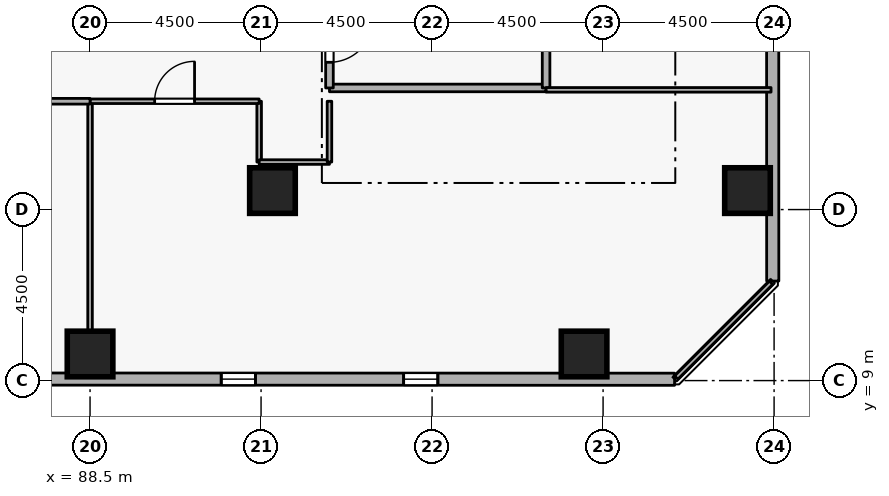
"""IFC4 building model, lengths in metres.
Left out: names, types, materials, properties, quantities, classifications, styles, units other than length and angle.
Written with IfcOpenShell. Run it as: python <this file> out.ifc"""

import sys

from ifc_helpers import new_model, si_unit, direction, frame, frame_2d, origin, origin_2d, place, context, subcontext, project, spatial, rectangle, extrude, element, fill, save


model = new_model("IFC4")
c1 = context("Model", 3, precision=1e-05, world=origin(), true_north=direction((0.0, 1.0)))
c2 = subcontext(c1, "Body", "Model", "MODEL_VIEW")
j1 = project(units=[si_unit("LENGTHUNIT", "METRE"), si_unit("PLANEANGLEUNIT", "RADIAN")], contexts=[c1])
p1 = place(None, origin())
s1 = spatial("IfcSite", under=j1, at=p1, CompositionType="ELEMENT")
p2 = place(p1, origin())
s2 = spatial("IfcBuilding", under=s1, at=p2, CompositionType="ELEMENT")
p3 = place(p2, frame((0.0, 0.0, 83.7)))
s3 = spatial("IfcBuildingStorey", under=s2, at=p3, CompositionType="ELEMENT", Elevation=83.7)
for number, where, z_axis, x_axis in (
    (1, (105.8, 14.0, 0.0), (0.0, 0.0, 1.0), (1.0, 0.0, 0.0)),
    (2, (101.5, 9.7, 0.0), (0.0, 0.0, 1.0), (1.0, 0.0, 0.0)),
    (3, (88.5, 9.7, 0.0), (0.0, 0.0, 1.0), (1.0, 0.0, 0.0)),
    (4, (93.3, 14.0, 0.0), (0.0, 0.0, 1.0), (1.0, 0.0, 0.0)),
):
    element("IfcColumn", number, at=place(p3, frame(where, z_axis=z_axis, x_axis=x_axis)), inside=s3, PredefinedType="COLUMN", context=c2, shape_type="SweptSolid", body=[
        extrude(rectangle(XDim=1.2, YDim=1.2, at=origin_2d()), origin(), (0.0, 0.0, 1.0), 3.6),
    ])
p4 = place(p3, frame((70.052, 9.045, 0.0), z_axis=(0.0, 0.0, 1.0), x_axis=(0.999999960392, -0.000281454314, 0.0)))
e5 = element("IfcWall", 5, at=p4, inside=s3, PredefinedType="STANDARD", context=c2, shape_type="SweptSolid", body=[
    extrude(rectangle(XDim=33.83, YDim=0.32, at=frame_2d((16.915, 0.0))), origin(), (0.0, 0.0, 1.0), 2.7),
])
p5 = place(p4, frame((7.5, 0.0, 0.72)))
e6 = element("IfcOpeningElement", 6, at=p5, cuts=e5, PredefinedType="OPENING", context=c2, shape_type="SweptSolid", body=[
    extrude(rectangle(XDim=0.9, YDim=1.75, at=frame_2d((0.45, 0.875))), frame((0.0, 0.17, 0.0), z_axis=(0.0, -1.0, 0.0), x_axis=(1.0, 0.0, 0.0)), (0.0, 0.0, 1.0), 0.34),
])
p6 = place(p4, frame((12.3, 0.0, 0.72)))
e7 = element("IfcOpeningElement", 7, at=p6, cuts=e5, PredefinedType="OPENING", context=c2, shape_type="SweptSolid", body=[
    extrude(rectangle(XDim=0.9, YDim=1.75, at=frame_2d((0.45, 0.875))), frame((0.0, 0.17, 0.0), z_axis=(0.0, -1.0, 0.0), x_axis=(1.0, 0.0, 0.0)), (0.0, 0.0, 1.0), 0.34),
])
p7 = place(p4, frame((21.9, 0.0, 0.72)))
e8 = element("IfcOpeningElement", 8, at=p7, cuts=e5, PredefinedType="OPENING", context=c2, shape_type="SweptSolid", body=[
    extrude(rectangle(XDim=0.9, YDim=1.75, at=frame_2d((0.45, 0.875))), frame((0.0, 0.17, 0.0), z_axis=(0.0, -1.0, 0.0), x_axis=(1.0, 0.0, 0.0)), (0.0, 0.0, 1.0), 0.34),
])
p8 = place(p4, frame((26.7, 0.0, 0.72)))
e9 = element("IfcOpeningElement", 9, at=p8, cuts=e5, PredefinedType="OPENING", context=c2, shape_type="SweptSolid", body=[
    extrude(rectangle(XDim=0.9, YDim=1.75, at=frame_2d((0.45, 0.875))), frame((0.0, 0.17, 0.0), z_axis=(0.0, -1.0, 0.0), x_axis=(1.0, 0.0, 0.0)), (0.0, 0.0, 1.0), 0.34),
])
p9 = place(p3, frame((106.465, 11.619, 0.0), z_axis=(0.0, 0.0, 1.0), x_axis=(-0.000281454314, 0.999999960392, 0.0)))
e10 = element("IfcWall", 10, at=p9, inside=s3, PredefinedType="STANDARD", context=c2, shape_type="SweptSolid", body=[
    extrude(rectangle(XDim=33.83, YDim=0.32, at=frame_2d((16.915, 0.0))), origin(), (0.0, 0.0, 1.0), 2.7),
])
p10 = place(p9, frame((7.5, 0.0, 0.72)))
e11 = element("IfcOpeningElement", 11, at=p10, cuts=e10, PredefinedType="OPENING", context=c2, shape_type="SweptSolid", body=[
    extrude(rectangle(XDim=0.9, YDim=1.75, at=frame_2d((0.45, 0.875))), frame((0.0, 0.17, 0.0), z_axis=(0.0, -1.0, 0.0), x_axis=(1.0, 0.0, 0.0)), (0.0, 0.0, 1.0), 0.34),
])
p11 = place(p9, frame((12.3, 0.0, 0.72)))
e12 = element("IfcOpeningElement", 12, at=p11, cuts=e10, PredefinedType="OPENING", context=c2, shape_type="SweptSolid", body=[
    extrude(rectangle(XDim=0.9, YDim=1.75, at=frame_2d((0.45, 0.875))), frame((0.0, 0.17, 0.0), z_axis=(0.0, -1.0, 0.0), x_axis=(1.0, 0.0, 0.0)), (0.0, 0.0, 1.0), 0.34),
])
p12 = place(p9, frame((17.1, 0.0, 0.72)))
e13 = element("IfcOpeningElement", 13, at=p12, cuts=e10, PredefinedType="OPENING", context=c2, shape_type="SweptSolid", body=[
    extrude(rectangle(XDim=0.9, YDim=1.75, at=frame_2d((0.45, 0.875))), frame((0.0, 0.17, 0.0), z_axis=(0.0, -1.0, 0.0), x_axis=(1.0, 0.0, 0.0)), (0.0, 0.0, 1.0), 0.34),
])
p13 = place(p9, frame((21.9, 0.0, 0.72)))
e14 = element("IfcOpeningElement", 14, at=p13, cuts=e10, PredefinedType="OPENING", context=c2, shape_type="SweptSolid", body=[
    extrude(rectangle(XDim=0.9, YDim=1.75, at=frame_2d((0.45, 0.875))), frame((0.0, 0.17, 0.0), z_axis=(0.0, -1.0, 0.0), x_axis=(1.0, 0.0, 0.0)), (0.0, 0.0, 1.0), 0.34),
])
p14 = place(p3, frame((94.8, 16.7, 0.0), z_axis=(0.0, 0.0, 1.0), x_axis=(1.0, 0.0, 0.0)))
e15 = element("IfcWall", 15, at=p14, inside=s3, PredefinedType="STANDARD", context=c2, shape_type="SweptSolid", body=[
    extrude(rectangle(XDim=5.7, YDim=0.2, at=frame_2d((2.85, 0.0))), origin(), (0.0, 0.0, 1.0), 3.34),
])
p15 = place(p3, frame((100.5, 16.7, 0.0), z_axis=(0.0, 0.0, 1.0), x_axis=(0.0, 1.0, 0.0)))
e16 = element("IfcWall", 16, at=p15, inside=s3, PredefinedType="STANDARD", context=c2, shape_type="SweptSolid", body=[
    extrude(rectangle(XDim=2.5, YDim=0.2, at=frame_2d((1.25, 0.0))), origin(), (0.0, 0.0, 1.0), 3.34),
])
p16 = place(p3, frame((94.8, 19.2, 0.0), z_axis=(0.0, 0.0, 1.0), x_axis=(0.0, -1.0, 0.0)))
e17 = element("IfcWall", 17, at=p16, inside=s3, PredefinedType="STANDARD", context=c2, shape_type="SweptSolid", body=[
    extrude(rectangle(XDim=2.5, YDim=0.2, at=frame_2d((1.25, 0.0))), origin(), (0.0, 0.0, 1.0), 3.34),
])
p17 = place(p16, frame((0.675, 0.0, 0.0)))
e18 = element("IfcOpeningElement", 18, at=p17, cuts=e17, PredefinedType="OPENING", context=c2, shape_type="SweptSolid", body=[
    extrude(rectangle(XDim=1.15, YDim=2.1, at=frame_2d((0.575, 1.05))), frame((0.0, 0.11, 0.0), z_axis=(0.0, -1.0, 0.0), x_axis=(1.0, 0.0, 0.0)), (0.0, 0.0, 1.0), 0.22),
])
p18 = place(p3, frame((92.95, 16.35, 0.0), z_axis=(0.0, 0.0, 1.0), x_axis=(0.0, -1.0, 0.0)))
e19 = element("IfcWall", 19, at=p18, inside=s3, PredefinedType="PARTITIONING", context=c2, shape_type="SweptSolid", body=[
    extrude(rectangle(XDim=1.6, YDim=0.12, at=frame_2d((0.8, 0.0))), origin(), (0.0, 0.0, 1.0), 3.34),
])
p19 = place(p3, frame((92.95, 14.75, 0.0), z_axis=(0.0, 0.0, 1.0), x_axis=(1.0, 0.0, 0.0)))
e20 = element("IfcWall", 20, at=p19, inside=s3, PredefinedType="PARTITIONING", context=c2, shape_type="SweptSolid", body=[
    extrude(rectangle(XDim=1.85, YDim=0.12, at=frame_2d((0.925, 0.0))), origin(), (0.0, 0.0, 1.0), 3.34),
])
p20 = place(p3, frame((94.8, 14.75, 0.0), z_axis=(0.0, 0.0, 1.0), x_axis=(0.0, 1.0, 0.0)))
e21 = element("IfcWall", 21, at=p20, inside=s3, PredefinedType="PARTITIONING", context=c2, shape_type="SweptSolid", body=[
    extrude(rectangle(XDim=1.6, YDim=0.12, at=frame_2d((0.8, 0.0))), origin(), (0.0, 0.0, 1.0), 3.34),
])
p21 = place(p3, frame((100.5, 16.65, 0.0), z_axis=(0.0, 0.0, 1.0), x_axis=(1.0, 0.0, 0.0)))
e22 = element("IfcWall", 22, at=p21, inside=s3, PredefinedType="PARTITIONING", context=c2, shape_type="SweptSolid", body=[
    extrude(rectangle(XDim=5.92, YDim=0.12, at=frame_2d((2.96, 0.0))), origin(), (0.0, 0.0, 1.0), 3.34),
])
p22 = place(p3, frame((106.42, 11.575, 0.0), z_axis=(0.0, 0.0, 1.0), x_axis=(-0.707106781187, -0.707106781187, 0.0)))
e23 = element("IfcWall", 23, at=p22, inside=s3, PredefinedType="PARTITIONING", context=c2, shape_type="SweptSolid", body=[
    extrude(rectangle(XDim=3.528, YDim=0.12, at=frame_2d((1.764, 0.0))), origin(), (0.0, 0.0, 1.0), 3.34),
])
p23 = place(p3, frame((88.5, 9.08, 0.0), z_axis=(0.0, 0.0, 1.0), x_axis=(0.0, 1.0, 0.0)))
e24 = element("IfcWall", 24, at=p23, inside=s3, PredefinedType="PARTITIONING", context=c2, shape_type="SweptSolid", body=[
    extrude(rectangle(XDim=7.27, YDim=0.12, at=frame_2d((3.635, 0.0))), origin(), (0.0, 0.0, 1.0), 2.882),
])
p24 = place(p3, frame((88.5, 16.35, 0.0), z_axis=(0.0, 0.0, 1.0), x_axis=(1.0, 0.0, 0.0)))
e25 = element("IfcWall", 25, at=p24, inside=s3, PredefinedType="PARTITIONING", context=c2, shape_type="SweptSolid", body=[
    extrude(rectangle(XDim=4.45, YDim=0.12, at=frame_2d((2.225, 0.0))), origin(), (0.0, 0.0, 1.0), 3.34),
])
p25 = place(p24, frame((1.7, 0.0, 0.0)))
e26 = element("IfcOpeningElement", 26, at=p25, cuts=e25, PredefinedType="OPENING", context=c2, shape_type="SweptSolid", body=[
    extrude(rectangle(XDim=1.05, YDim=2.1, at=frame_2d((0.525, 1.05))), frame((0.0, 0.07, 0.0), z_axis=(0.0, -1.0, 0.0), x_axis=(1.0, 0.0, 0.0)), (0.0, 0.0, 1.0), 0.14),
])
p26 = place(p3, frame((84.05, 16.35, 0.0), z_axis=(0.0, 0.0, 1.0), x_axis=(1.0, 0.0, 0.0)))
e27 = element("IfcWall", 27, at=p26, inside=s3, PredefinedType="PARTITIONING", context=c2, shape_type="SweptSolid", body=[
    extrude(rectangle(XDim=4.45, YDim=0.15, at=frame_2d((2.225, 0.0))), origin(), (0.0, 0.0, 1.0), 3.34),
])
p27 = place(p26, frame((1.575, 0.0, 0.0)))
e28 = element("IfcOpeningElement", 28, at=p27, cuts=e27, PredefinedType="OPENING", context=c2, shape_type="SweptSolid", body=[
    extrude(rectangle(XDim=1.3, YDim=2.12, at=frame_2d((0.65, 1.06))), frame((0.0, 0.085, 0.0), z_axis=(0.0, -1.0, 0.0), x_axis=(1.0, 0.0, 0.0)), (0.0, 0.0, 1.0), 0.17),
])
p28 = place(p7, origin())
e29 = element("IfcWindow", 29, at=p28, inside=s3, PartitioningType="SINGLE_PANEL", PredefinedType="WINDOW", context=c2, shape_type="SweptSolid", body=[
    extrude(rectangle(XDim=0.9, YDim=1.75, at=frame_2d((0.45, 0.875))), frame((0.0, 0.03, 0.0), z_axis=(0.0, -1.0, 0.0), x_axis=(1.0, 0.0, 0.0)), (0.0, 0.0, 1.0), 0.06),
])
fill(e8, e29)
p29 = place(p8, origin())
e30 = element("IfcWindow", 30, at=p29, inside=s3, PartitioningType="SINGLE_PANEL", PredefinedType="WINDOW", context=c2, shape_type="SweptSolid", body=[
    extrude(rectangle(XDim=0.9, YDim=1.75, at=frame_2d((0.45, 0.875))), frame((0.0, 0.03, 0.0), z_axis=(0.0, -1.0, 0.0), x_axis=(1.0, 0.0, 0.0)), (0.0, 0.0, 1.0), 0.06),
])
fill(e9, e30)
p30 = place(p17, origin())
e31 = element("IfcDoor", 31, at=p30, inside=s3, OperationType="SINGLE_SWING_LEFT", PredefinedType="DOOR", context=c2, shape_type="SweptSolid", body=[
    extrude(rectangle(XDim=1.15, YDim=2.1, at=frame_2d((0.575, 1.05))), frame((0.0, 0.025, 0.0), z_axis=(0.0, -1.0, 0.0), x_axis=(1.0, 0.0, 0.0)), (0.0, 0.0, 1.0), 0.05),
])
fill(e18, e31)
p31 = place(p25, origin())
e32 = element("IfcDoor", 32, at=p31, inside=s3, OperationType="SINGLE_SWING_RIGHT", PredefinedType="DOOR", context=c2, shape_type="SweptSolid", body=[
    extrude(rectangle(XDim=1.05, YDim=2.1, at=frame_2d((0.525, 1.05))), frame((0.0, 0.025, 0.0), z_axis=(0.0, -1.0, 0.0), x_axis=(1.0, 0.0, 0.0)), (0.0, 0.0, 1.0), 0.05),
])
fill(e26, e32)
save(model, sys.argv[1])
